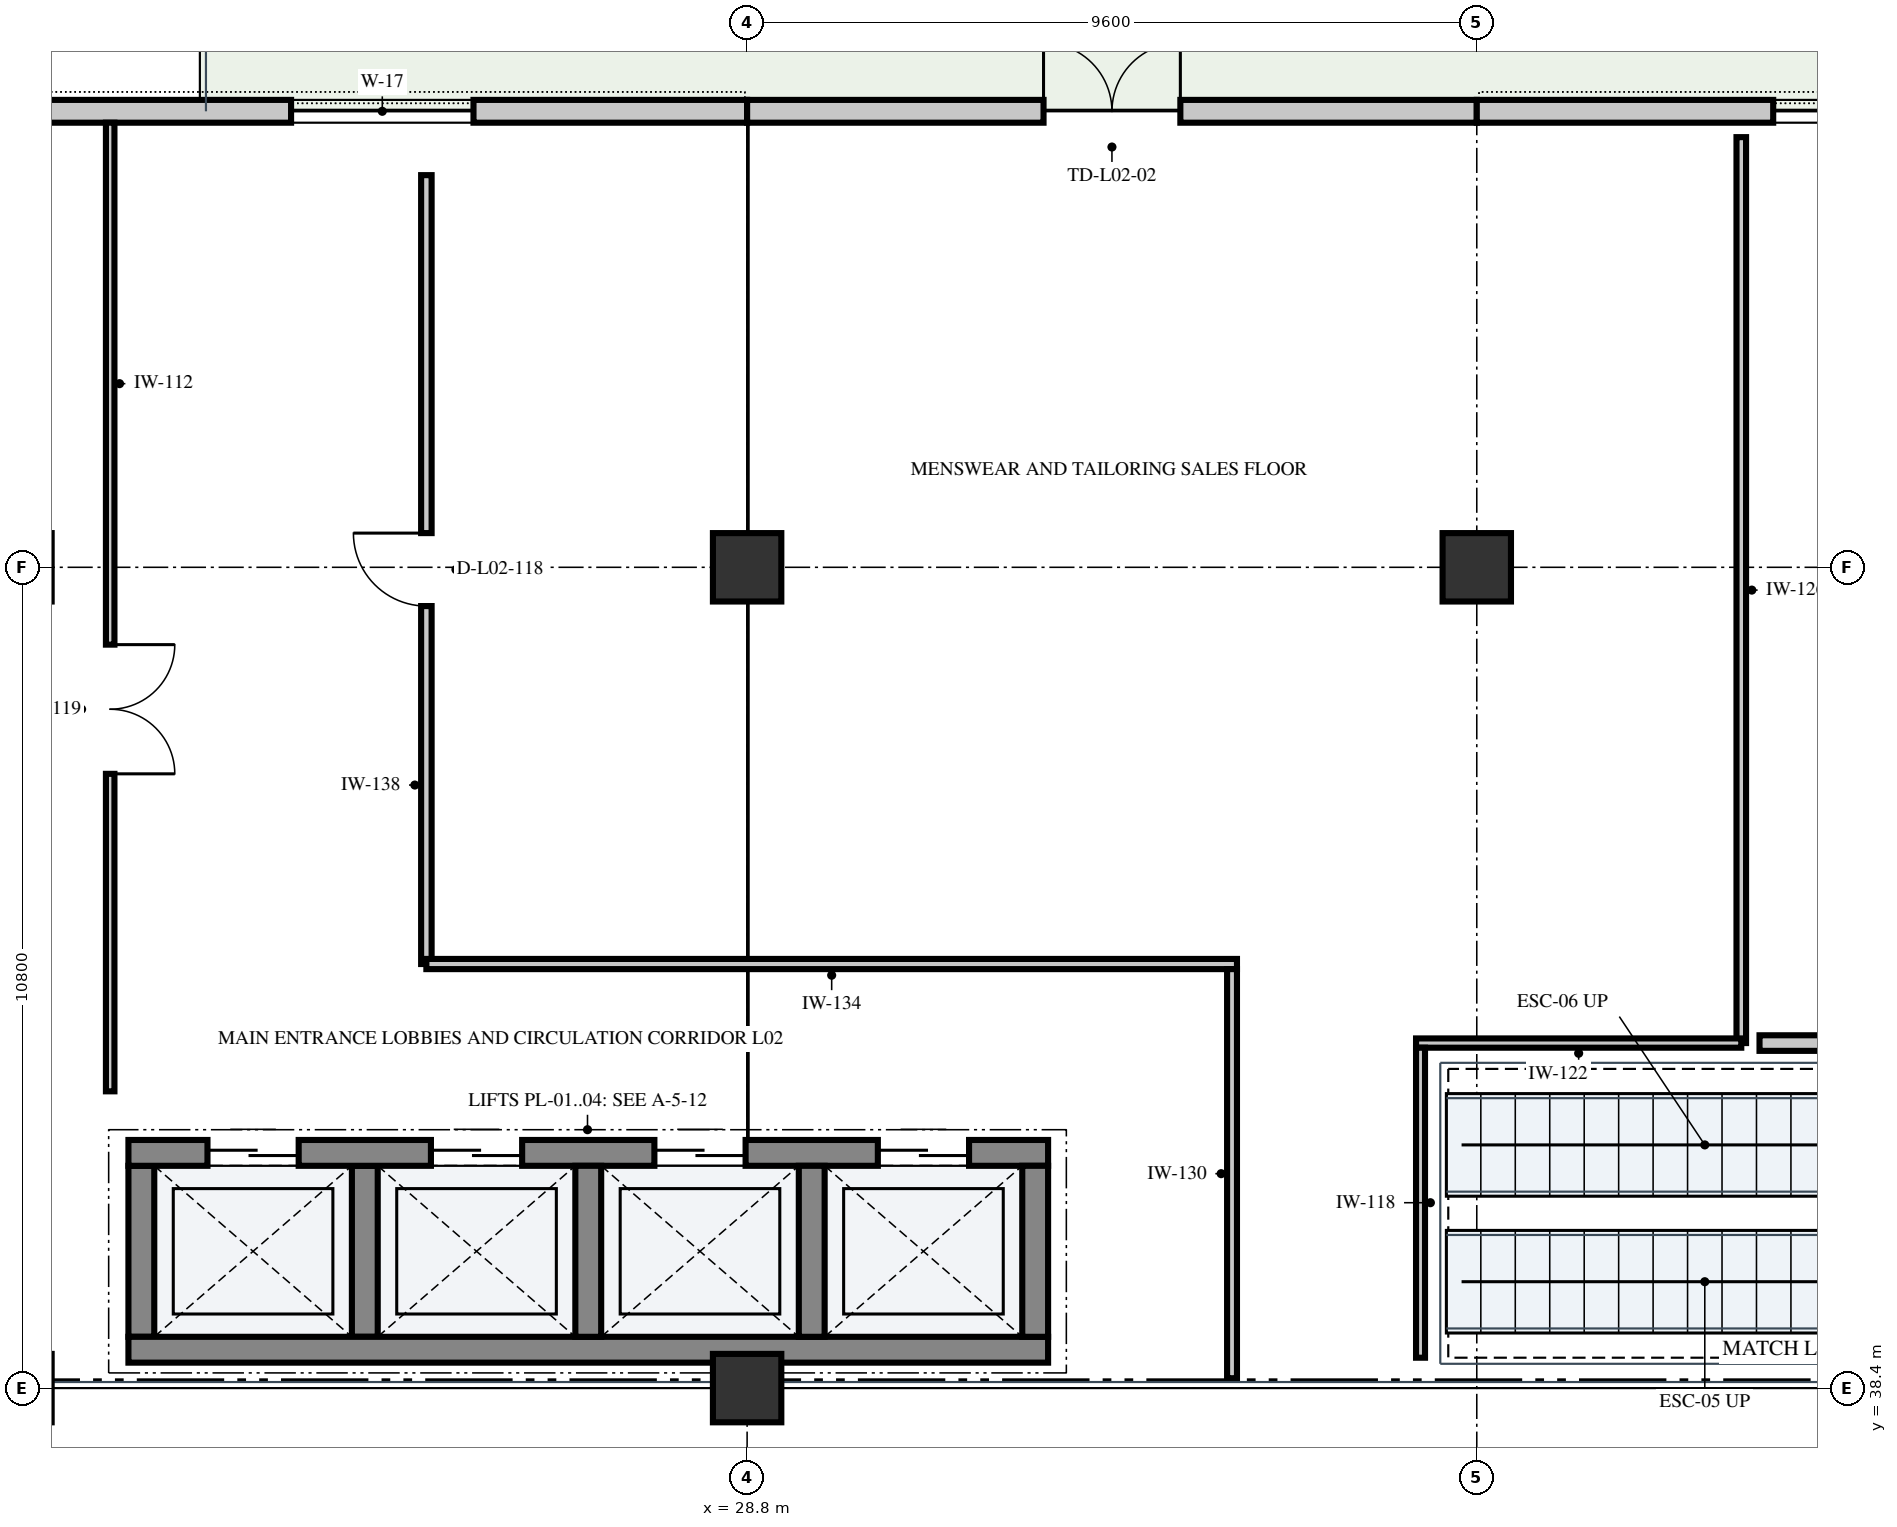
"""IFC4 building model, lengths in metres.
Left out: names, types, materials, properties, quantities, classifications, styles, units other than length and angle.
Written with IfcOpenShell. Run it as: python <this file> out.ifc"""

import sys

from ifc_helpers import new_model, si_unit, direction, frame, frame_2d, origin, origin_2d, place, context, subcontext, project, spatial, rectangle, extrude, element, fill, save


model = new_model("IFC4")
c1 = context("Model", 3, precision=1e-05, world=origin(), true_north=direction((0.0, 1.0)))
c2 = subcontext(c1, "Body", "Model", "MODEL_VIEW")
j1 = project(units=[si_unit("LENGTHUNIT", "METRE"), si_unit("PLANEANGLEUNIT", "RADIAN")], contexts=[c1])
p1 = place(None, origin())
s1 = spatial("IfcSite", under=j1, at=p1, CompositionType="ELEMENT")
p2 = place(p1, origin())
s2 = spatial("IfcBuilding", under=s1, at=p2, CompositionType="ELEMENT")
p3 = place(p2, frame((0.0, 0.0, 10.2)))
s3 = spatial("IfcBuildingStorey", under=s2, at=p3, CompositionType="ELEMENT", Elevation=10.2)
for number, where, z_axis, x_axis in (
    (1, (28.8, 38.4, 0.0), (0.0, 0.0, 1.0), (1.0, 0.0, 0.0)),
    (2, (28.8, 49.2, 0.0), (0.0, 0.0, 1.0), (1.0, 0.0, 0.0)),
    (3, (38.4, 49.2, 0.0), (0.0, 0.0, 1.0), (1.0, 0.0, 0.0)),
):
    element("IfcColumn", number, at=place(p3, frame(where, z_axis=z_axis, x_axis=x_axis)), inside=s3, PredefinedType="COLUMN", context=c2, shape_type="SweptSolid", body=[
        extrude(rectangle(XDim=0.9, YDim=0.9, at=origin_2d()), origin(), (0.0, 0.0, 1.0), 4.8),
    ])
p4 = place(p3, frame((19.2, 55.2, 0.0), z_axis=(0.0, 0.0, 1.0), x_axis=(1.0, 0.0, 0.0)))
e4 = element("IfcWall", 4, at=p4, inside=s3, PredefinedType="SOLIDWALL", context=c2, shape_type="SweptSolid", body=[
    extrude(rectangle(XDim=9.6, YDim=0.3, at=frame_2d((4.8, 0.0))), origin(), (0.0, 0.0, 1.0), 4.515),
])
p5 = place(p4, frame((3.6, 0.0, 2.2)))
e5 = element("IfcOpeningElement", 5, at=p5, cuts=e4, PredefinedType="OPENING", context=c2, shape_type="SweptSolid", body=[
    extrude(rectangle(XDim=2.4, YDim=1.2, at=frame_2d((1.2, 0.6))), frame((0.0, 0.162, 0.0), z_axis=(0.0, -1.0, 0.0), x_axis=(1.0, 0.0, 0.0)), (0.0, 0.0, 1.0), 0.324),
])
p6 = place(p3, frame((28.8, 55.2, 0.0), z_axis=(0.0, 0.0, 1.0), x_axis=(1.0, 0.0, 0.0)))
e6 = element("IfcWall", 6, at=p6, inside=s3, PredefinedType="SOLIDWALL", context=c2, shape_type="SweptSolid", body=[
    extrude(rectangle(XDim=9.6, YDim=0.3, at=frame_2d((4.8, 0.0))), origin(), (0.0, 0.0, 1.0), 4.515),
])
p7 = place(p6, frame((3.9, 0.0, 0.0)))
e7 = element("IfcOpeningElement", 7, at=p7, cuts=e6, PredefinedType="OPENING", context=c2, shape_type="SweptSolid", body=[
    extrude(rectangle(XDim=1.8, YDim=2.35, at=frame_2d((0.9, 1.175))), frame((0.0, 0.162, 0.0), z_axis=(0.0, -1.0, 0.0), x_axis=(1.0, 0.0, 0.0)), (0.0, 0.0, 1.0), 0.324),
])
p8 = place(p3, frame((38.4, 55.2, 0.0), z_axis=(0.0, 0.0, 1.0), x_axis=(1.0, 0.0, 0.0)))
e8 = element("IfcWall", 8, at=p8, inside=s3, PredefinedType="SOLIDWALL", context=c2, shape_type="SweptSolid", body=[
    extrude(rectangle(XDim=9.6, YDim=0.3, at=frame_2d((4.8, 0.0))), origin(), (0.0, 0.0, 1.0), 4.515),
])
p9 = place(p8, frame((3.9, 0.0, 1.2)))
e9 = element("IfcOpeningElement", 9, at=p9, cuts=e8, PredefinedType="OPENING", context=c2, shape_type="SweptSolid", body=[
    extrude(rectangle(XDim=1.8, YDim=1.5, at=frame_2d((0.9, 0.75))), frame((0.0, 0.162, 0.0), z_axis=(0.0, -1.0, 0.0), x_axis=(1.0, 0.0, 0.0)), (0.0, 0.0, 1.0), 0.324),
])
for number, where, z_axis, x_axis in (
    (10, (23.77, 39.075, 0.0), (0.0, 0.0, 1.0), (0.0, 1.0, 0.0)),
    (11, (20.83, 39.075, 0.0), (0.0, 0.0, 1.0), (0.0, 1.0, 0.0)),
):
    element("IfcWall", number, at=place(p3, frame(where, z_axis=z_axis, x_axis=x_axis)), inside=s3, PredefinedType="SHEAR", context=c2, shape_type="SweptSolid", body=[
        extrude(rectangle(XDim=2.25, YDim=0.34, at=frame_2d((1.125, 0.0))), origin(), (0.0, 0.0, 1.0), 4.515),
    ])
p10 = place(p3, frame((20.66, 38.905, 0.0), z_axis=(0.0, 0.0, 1.0), x_axis=(1.0, 0.0, 0.0)))
e12 = element("IfcWall", 12, at=p10, inside=s3, PredefinedType="SHEAR", context=c2, shape_type="SweptSolid", body=[
    extrude(rectangle(XDim=12.1, YDim=0.34, at=frame_2d((6.05, 0.0))), origin(), (0.0, 0.0, 1.0), 4.515),
])
p11 = place(p3, frame((20.66, 41.495, 0.0), z_axis=(0.0, 0.0, 1.0), x_axis=(1.0, 0.0, 0.0)))
e13 = element("IfcWall", 13, at=p11, inside=s3, PredefinedType="SHEAR", context=c2, shape_type="SweptSolid", body=[
    extrude(rectangle(XDim=12.1, YDim=0.34, at=frame_2d((6.05, 0.0))), origin(), (0.0, 0.0, 1.0), 4.515),
])
p12 = place(p11, frame((1.04, 0.0, 0.0)))
e14 = element("IfcOpeningElement", 14, at=p12, cuts=e13, PredefinedType="OPENING", context=c2, shape_type="SweptSolid", body=[
    extrude(rectangle(XDim=1.2, YDim=2.2, at=frame_2d((0.6, 1.1))), frame((0.0, 0.182, 0.0), z_axis=(0.0, -1.0, 0.0), x_axis=(1.0, 0.0, 0.0)), (0.0, 0.0, 1.0), 0.364),
])
p13 = place(p11, frame((3.98, 0.0, 0.0)))
e15 = element("IfcOpeningElement", 15, at=p13, cuts=e13, PredefinedType="OPENING", context=c2, shape_type="SweptSolid", body=[
    extrude(rectangle(XDim=1.2, YDim=2.2, at=frame_2d((0.6, 1.1))), frame((0.0, 0.182, 0.0), z_axis=(0.0, -1.0, 0.0), x_axis=(1.0, 0.0, 0.0)), (0.0, 0.0, 1.0), 0.364),
])
p14 = place(p11, frame((6.92, 0.0, 0.0)))
e16 = element("IfcOpeningElement", 16, at=p14, cuts=e13, PredefinedType="OPENING", context=c2, shape_type="SweptSolid", body=[
    extrude(rectangle(XDim=1.2, YDim=2.2, at=frame_2d((0.6, 1.1))), frame((0.0, 0.182, 0.0), z_axis=(0.0, -1.0, 0.0), x_axis=(1.0, 0.0, 0.0)), (0.0, 0.0, 1.0), 0.364),
])
p15 = place(p11, frame((9.86, 0.0, 0.0)))
e17 = element("IfcOpeningElement", 17, at=p15, cuts=e13, PredefinedType="OPENING", context=c2, shape_type="SweptSolid", body=[
    extrude(rectangle(XDim=1.2, YDim=2.2, at=frame_2d((0.6, 1.1))), frame((0.0, 0.182, 0.0), z_axis=(0.0, -1.0, 0.0), x_axis=(1.0, 0.0, 0.0)), (0.0, 0.0, 1.0), 0.364),
])
for number, where, z_axis, x_axis in (
    (18, (26.71, 39.075, 0.0), (0.0, 0.0, 1.0), (0.0, 1.0, 0.0)),
    (19, (29.65, 39.075, 0.0), (0.0, 0.0, 1.0), (0.0, 1.0, 0.0)),
    (20, (32.59, 39.075, 0.0), (0.0, 0.0, 1.0), (0.0, 1.0, 0.0)),
):
    element("IfcWall", number, at=place(p3, frame(where, z_axis=z_axis, x_axis=x_axis)), inside=s3, PredefinedType="SHEAR", context=c2, shape_type="SweptSolid", body=[
        extrude(rectangle(XDim=2.25, YDim=0.34, at=frame_2d((1.125, 0.0))), origin(), (0.0, 0.0, 1.0), 4.515),
    ])
p16 = place(p3, frame((24.58, 43.98, 0.0), z_axis=(0.0, 0.0, 1.0), x_axis=(0.0, 1.0, 0.0)))
e21 = element("IfcWall", 21, at=p16, inside=s3, PredefinedType="PARTITIONING", context=c2, shape_type="SweptSolid", body=[
    extrude(rectangle(XDim=10.38, YDim=0.138, at=frame_2d((5.19, 0.0))), origin(), (0.0, 0.0, 1.0), 3.455),
])
p17 = place(p16, frame((4.71, 0.0, 0.0)))
e22 = element("IfcOpeningElement", 22, at=p17, cuts=e21, PredefinedType="OPENING", context=c2, shape_type="SweptSolid", body=[
    extrude(rectangle(XDim=0.96, YDim=2.13, at=frame_2d((0.48, 1.065))), frame((0.0, 0.081, 0.0), z_axis=(0.0, -1.0, 0.0), x_axis=(1.0, 0.0, 0.0)), (0.0, 0.0, 1.0), 0.162),
])
p18 = place(p3, frame((35.245, 43.98, 0.0), z_axis=(0.0, 0.0, 1.0), x_axis=(-1.0, 0.0, 0.0)))
e23 = element("IfcWall", 23, at=p18, inside=s3, PredefinedType="PARTITIONING", context=c2, shape_type="SweptSolid", body=[
    extrude(rectangle(XDim=10.665, YDim=0.134, at=frame_2d((5.333, 0.0))), origin(), (0.0, 0.0, 1.0), 4.515),
])
p19 = place(p3, frame((35.18, 38.53, 0.0), z_axis=(0.0, 0.0, 1.0), x_axis=(0.0, 1.0, 0.0)))
e24 = element("IfcWall", 24, at=p19, inside=s3, PredefinedType="PARTITIONING", context=c2, shape_type="SweptSolid", body=[
    extrude(rectangle(XDim=5.383, YDim=0.13, at=frame_2d((2.691, 0.0))), origin(), (0.0, 0.0, 1.0), 4.515),
])
p20 = place(p3, frame((41.88, 54.86, 0.0), z_axis=(0.0, 0.0, 1.0), x_axis=(0.0, -1.0, 0.0)))
e25 = element("IfcWall", 25, at=p20, inside=s3, PredefinedType="PARTITIONING", context=c2, shape_type="SweptSolid", body=[
    extrude(rectangle(XDim=11.92, YDim=0.126, at=frame_2d((5.96, 0.0))), origin(), (0.0, 0.0, 1.0), 3.455),
])
p21 = place(p3, frame((41.88, 42.94, 0.0), z_axis=(0.0, 0.0, 1.0), x_axis=(-1.0, 0.0, 0.0)))
e26 = element("IfcWall", 26, at=p21, inside=s3, PredefinedType="PARTITIONING", context=c2, shape_type="SweptSolid", body=[
    extrude(rectangle(XDim=4.279, YDim=0.122, at=frame_2d((2.139, 0.0))), origin(), (0.0, 0.0, 1.0), 4.515),
])
p22 = place(p3, frame((37.66, 42.879, 0.0), z_axis=(0.0, 0.0, 1.0), x_axis=(0.0, -1.0, 0.0)))
e27 = element("IfcWall", 27, at=p22, inside=s3, PredefinedType="PARTITIONING", context=c2, shape_type="SweptSolid", body=[
    extrude(rectangle(XDim=4.079, YDim=0.118, at=frame_2d((2.04, 0.0))), origin(), (0.0, 0.0, 1.0), 4.515),
])
p23 = place(p3, frame((20.42, 55.05, 0.0), z_axis=(0.0, 0.0, 1.0), x_axis=(0.0, -1.0, 0.0)))
e28 = element("IfcWall", 28, at=p23, inside=s3, PredefinedType="PARTITIONING", context=c2, shape_type="SweptSolid", body=[
    extrude(rectangle(XDim=12.745, YDim=0.112, at=frame_2d((6.373, 0.0))), origin(), (0.0, 0.0, 1.0), 3.455),
])
p24 = place(p23, frame((6.867, 0.0, 0.0)))
e29 = element("IfcOpeningElement", 29, at=p24, cuts=e28, PredefinedType="OPENING", context=c2, shape_type="SweptSolid", body=[
    extrude(rectangle(XDim=1.7, YDim=2.3, at=frame_2d((0.85, 1.15))), frame((0.0, 0.068, 0.0), z_axis=(0.0, -1.0, 0.0), x_axis=(1.0, 0.0, 0.0)), (0.0, 0.0, 1.0), 0.136),
])
p25 = place(p3, frame((44.618, 42.94, 0.0), z_axis=(0.0, 0.0, 1.0), x_axis=(-1.0, 0.0, 0.0)))
e30 = element("IfcWall", 30, at=p25, inside=s3, PredefinedType="PARTITIONING", context=c2, shape_type="SweptSolid", body=[
    extrude(rectangle(XDim=2.498, YDim=0.205, at=frame_2d((1.249, 0.0))), origin(), (0.0, 0.0, 1.0), 4.515),
])
p26 = place(p5, origin())
e31 = element("IfcWindow", 31, at=p26, inside=s3, PartitioningType="SINGLE_PANEL", PredefinedType="WINDOW", context=c2, shape_type="SweptSolid", body=[
    extrude(rectangle(XDim=2.4, YDim=1.2, at=frame_2d((1.2, 0.6))), frame((0.0, 0.03, 0.0), z_axis=(0.0, -1.0, 0.0), x_axis=(1.0, 0.0, 0.0)), (0.0, 0.0, 1.0), 0.06),
])
fill(e5, e31)
p27 = place(p7, origin())
e32 = element("IfcDoor", 32, at=p27, inside=s3, OperationType="DOUBLE_DOOR_SINGLE_SWING", PredefinedType="DOOR", context=c2, shape_type="SweptSolid", body=[
    extrude(rectangle(XDim=1.8, YDim=2.35, at=frame_2d((0.9, 1.175))), frame((0.0, 0.025, 0.0), z_axis=(0.0, -1.0, 0.0), x_axis=(1.0, 0.0, 0.0)), (0.0, 0.0, 1.0), 0.05),
])
fill(e7, e32)
p28 = place(p9, origin())
e33 = element("IfcWindow", 33, at=p28, inside=s3, PartitioningType="SINGLE_PANEL", PredefinedType="WINDOW", context=c2, shape_type="SweptSolid", body=[
    extrude(rectangle(XDim=1.8, YDim=1.5, at=frame_2d((0.9, 0.75))), frame((0.0, 0.03, 0.0), z_axis=(0.0, -1.0, 0.0), x_axis=(1.0, 0.0, 0.0)), (0.0, 0.0, 1.0), 0.06),
])
fill(e9, e33)
p29 = place(p12, origin())
e34 = element("IfcDoor", 34, at=p29, inside=s3, OperationType="DOUBLE_DOOR_SLIDING", PredefinedType="DOOR", context=c2, shape_type="SweptSolid", body=[
    extrude(rectangle(XDim=1.2, YDim=2.2, at=frame_2d((0.6, 1.1))), frame((0.0, 0.025, 0.0), z_axis=(0.0, -1.0, 0.0), x_axis=(1.0, 0.0, 0.0)), (0.0, 0.0, 1.0), 0.05),
])
fill(e14, e34)
p30 = place(p13, origin())
e35 = element("IfcDoor", 35, at=p30, inside=s3, OperationType="DOUBLE_DOOR_SLIDING", PredefinedType="DOOR", context=c2, shape_type="SweptSolid", body=[
    extrude(rectangle(XDim=1.2, YDim=2.2, at=frame_2d((0.6, 1.1))), frame((0.0, 0.025, 0.0), z_axis=(0.0, -1.0, 0.0), x_axis=(1.0, 0.0, 0.0)), (0.0, 0.0, 1.0), 0.05),
])
fill(e15, e35)
p31 = place(p14, origin())
e36 = element("IfcDoor", 36, at=p31, inside=s3, OperationType="DOUBLE_DOOR_SLIDING", PredefinedType="DOOR", context=c2, shape_type="SweptSolid", body=[
    extrude(rectangle(XDim=1.2, YDim=2.2, at=frame_2d((0.6, 1.1))), frame((0.0, 0.025, 0.0), z_axis=(0.0, -1.0, 0.0), x_axis=(1.0, 0.0, 0.0)), (0.0, 0.0, 1.0), 0.05),
])
fill(e16, e36)
p32 = place(p15, origin())
e37 = element("IfcDoor", 37, at=p32, inside=s3, OperationType="DOUBLE_DOOR_SLIDING", PredefinedType="DOOR", context=c2, shape_type="SweptSolid", body=[
    extrude(rectangle(XDim=1.2, YDim=2.2, at=frame_2d((0.6, 1.1))), frame((0.0, 0.025, 0.0), z_axis=(0.0, -1.0, 0.0), x_axis=(1.0, 0.0, 0.0)), (0.0, 0.0, 1.0), 0.05),
])
fill(e17, e37)
p33 = place(p17, origin())
e38 = element("IfcDoor", 38, at=p33, inside=s3, OperationType="SINGLE_SWING_RIGHT", PredefinedType="DOOR", context=c2, shape_type="SweptSolid", body=[
    extrude(rectangle(XDim=0.96, YDim=2.13, at=frame_2d((0.48, 1.065))), frame((0.0, 0.025, 0.0), z_axis=(0.0, -1.0, 0.0), x_axis=(1.0, 0.0, 0.0)), (0.0, 0.0, 1.0), 0.05),
])
fill(e22, e38)
p34 = place(p24, origin())
e39 = element("IfcDoor", 39, at=p34, inside=s3, OperationType="DOUBLE_DOOR_SINGLE_SWING", PredefinedType="DOOR", context=c2, shape_type="SweptSolid", body=[
    extrude(rectangle(XDim=1.7, YDim=2.3, at=frame_2d((0.85, 1.15))), frame((0.0, 0.025, 0.0), z_axis=(0.0, -1.0, 0.0), x_axis=(1.0, 0.0, 0.0)), (0.0, 0.0, 1.0), 0.05),
])
fill(e29, e39)
save(model, sys.argv[1])
